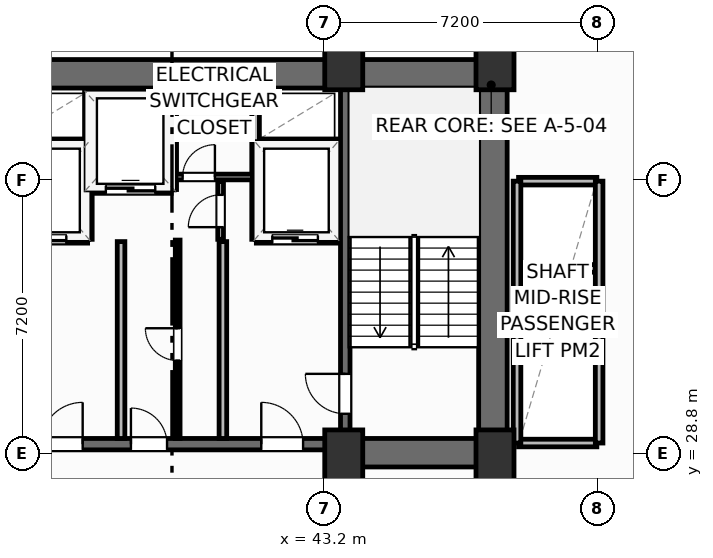
"""IFC4 building model, lengths in metres.
Left out: names, types, materials, properties, quantities, classifications, styles, units other than length and angle.
Written with IfcOpenShell. Run it as: python <this file> out.ifc"""

import sys

from ifc_helpers import new_model, si_unit, direction, frame, frame_2d, origin, origin_2d, place, context, subcontext, project, spatial, rectangle, extrude, element, fill, save


model = new_model("IFC4")
c1 = context("Model", 3, precision=1e-05, world=origin(), true_north=direction((0.0, 1.0)))
c2 = subcontext(c1, "Body", "Model", "MODEL_VIEW")
j1 = project(units=[si_unit("LENGTHUNIT", "METRE"), si_unit("PLANEANGLEUNIT", "RADIAN")], contexts=[c1])
p1 = place(None, origin())
s1 = spatial("IfcSite", under=j1, at=p1, CompositionType="ELEMENT")
p2 = place(p1, origin())
s2 = spatial("IfcBuilding", under=s1, at=p2, CompositionType="ELEMENT")
p3 = place(p2, frame((0.0, 0.0, 76.2)))
s3 = spatial("IfcBuildingStorey", under=s2, at=p3, CompositionType="ELEMENT", Elevation=76.2)
for number, where, z_axis, x_axis in (
    (1, (43.72, 28.75, 0.0), (0.0, 0.0, 1.0), (1.0, 0.0, 0.0)),
    (2, (47.7, 28.75, 0.0), (0.0, 0.0, 1.0), (1.0, 0.0, 0.0)),
    (3, (43.72, 39.05, 0.0), (0.0, 0.0, 1.0), (1.0, 0.0, 0.0)),
    (4, (47.7, 39.05, 0.0), (0.0, 0.0, 1.0), (1.0, 0.0, 0.0)),
):
    element("IfcColumn", number, at=place(p3, frame(where, z_axis=z_axis, x_axis=x_axis)), inside=s3, PredefinedType="COLUMN", context=c2, shape_type="SweptSolid", body=[
        extrude(rectangle(XDim=1.0, YDim=1.35, at=origin_2d()), origin(), (0.0, 0.0, 1.0), 3.7),
    ])
p4 = place(p3, frame((30.38, 38.795, 0.0), z_axis=(0.0, 0.0, 1.0), x_axis=(1.0, 0.0, 0.0)))
e5 = element("IfcWall", 5, at=p4, inside=s3, PredefinedType="SHEAR", context=c2, shape_type="SweptSolid", body=[
    extrude(rectangle(XDim=17.64, YDim=0.75, at=frame_2d((8.82, 0.0))), origin(), (0.0, 0.0, 1.0), 3.45),
])
p5 = place(p3, frame((47.645, 29.2, 0.0), z_axis=(0.0, 0.0, 1.0), x_axis=(0.0, 1.0, 0.0)))
e6 = element("IfcWall", 6, at=p5, inside=s3, PredefinedType="SHEAR", context=c2, shape_type="SweptSolid", body=[
    extrude(rectangle(XDim=9.22, YDim=0.75, at=frame_2d((4.61, 0.0))), origin(), (0.0, 0.0, 1.0), 3.45),
])
p6 = place(p3, frame((43.6, 28.825, 0.0), z_axis=(0.0, 0.0, 1.0), x_axis=(1.0, 0.0, 0.0)))
e7 = element("IfcWall", 7, at=p6, inside=s3, PredefinedType="SHEAR", context=c2, shape_type="SweptSolid", body=[
    extrude(rectangle(XDim=4.42, YDim=0.75, at=frame_2d((2.21, 0.0))), origin(), (0.0, 0.0, 1.0), 3.45),
])
p7 = place(p3, frame((34.8, 29.05, 0.0), z_axis=(0.0, 0.0, 1.0), x_axis=(1.0, 0.0, 0.0)))
e8 = element("IfcWall", 8, at=p7, inside=s3, PredefinedType="SHEAR", context=c2, shape_type="SweptSolid", body=[
    extrude(rectangle(XDim=8.8, YDim=0.3, at=frame_2d((4.4, 0.0))), origin(), (0.0, 0.0, 1.0), 3.45),
])
p8 = place(p7, frame((0.95, 0.0, 0.0)))
e9 = element("IfcOpeningElement", 9, at=p8, cuts=e8, PredefinedType="OPENING", context=c2, shape_type="SweptSolid", body=[
    extrude(rectangle(XDim=1.1, YDim=2.15, at=frame_2d((0.55, 1.075))), frame((0.0, 0.16, 0.0), z_axis=(0.0, -1.0, 0.0), x_axis=(1.0, 0.0, 0.0)), (0.0, 0.0, 1.0), 0.32),
])
p9 = place(p7, frame((6.75, 0.0, 0.0)))
e10 = element("IfcOpeningElement", 10, at=p9, cuts=e8, PredefinedType="OPENING", context=c2, shape_type="SweptSolid", body=[
    extrude(rectangle(XDim=1.1, YDim=2.15, at=frame_2d((0.55, 1.075))), frame((0.0, 0.16, 0.0), z_axis=(0.0, -1.0, 0.0), x_axis=(1.0, 0.0, 0.0)), (0.0, 0.0, 1.0), 0.32),
])
p10 = place(p7, frame((3.32, 0.0, 0.0)))
e11 = element("IfcOpeningElement", 11, at=p10, cuts=e8, PredefinedType="OPENING", context=c2, shape_type="SweptSolid", body=[
    extrude(rectangle(XDim=0.95, YDim=2.15, at=frame_2d((0.475, 1.075))), frame((0.0, 0.16, 0.0), z_axis=(0.0, -1.0, 0.0), x_axis=(1.0, 0.0, 0.0)), (0.0, 0.0, 1.0), 0.32),
])
p11 = place(p3, frame((43.76, 29.2, 0.0), z_axis=(0.0, 0.0, 1.0), x_axis=(0.0, 1.0, 0.0)))
e12 = element("IfcWall", 12, at=p11, inside=s3, PredefinedType="SHEAR", context=c2, shape_type="SweptSolid", body=[
    extrude(rectangle(XDim=9.22, YDim=0.25, at=frame_2d((4.61, 0.0))), origin(), (0.0, 0.0, 1.0), 3.45),
])
p12 = place(p11, frame((0.65, 0.0, 0.0)))
e13 = element("IfcOpeningElement", 13, at=p12, cuts=e12, PredefinedType="OPENING", context=c2, shape_type="SweptSolid", body=[
    extrude(rectangle(XDim=1.05, YDim=2.15, at=frame_2d((0.525, 1.075))), frame((0.0, 0.135, 0.0), z_axis=(0.0, -1.0, 0.0), x_axis=(1.0, 0.0, 0.0)), (0.0, 0.0, 1.0), 0.27),
])
for number, where, z_axis, x_axis in (
    (14, (37.86, 29.2, 0.0), (0.0, 0.0, 1.0), (0.0, 1.0, 0.0)),
    (15, (40.54, 29.2, 0.0), (0.0, 0.0, 1.0), (0.0, 1.0, 0.0)),
):
    element("IfcWall", number, at=place(p3, frame(where, z_axis=z_axis, x_axis=x_axis)), inside=s3, PredefinedType="PARTITIONING", context=c2, shape_type="SweptSolid", body=[
        extrude(rectangle(XDim=5.18, YDim=0.2, at=frame_2d((2.59, 0.0))), origin(), (0.0, 0.0, 1.0), 3.45),
    ])
p13 = place(p3, frame((34.8, 34.44, 0.0), z_axis=(0.0, 0.0, 1.0), x_axis=(1.0, 0.0, 0.0)))
e16 = element("IfcWall", 16, at=p13, inside=s3, PredefinedType="PARTITIONING", context=c2, shape_type="SweptSolid", body=[
    extrude(rectangle(XDim=2.18, YDim=0.2, at=frame_2d((1.09, 0.0))), origin(), (0.0, 0.0, 1.0), 3.45),
])
p14 = place(p13, frame((0.42, 0.0, 0.0)))
e17 = element("IfcOpeningElement", 17, at=p14, cuts=e16, PredefinedType="OPENING", context=c2, shape_type="SweptSolid", body=[
    extrude(rectangle(XDim=1.2, YDim=2.2, at=frame_2d((0.6, 1.1))), frame((0.0, 0.11, 0.0), z_axis=(0.0, -1.0, 0.0), x_axis=(1.0, 0.0, 0.0)), (0.0, 0.0, 1.0), 0.22),
])
p15 = place(p3, frame((34.8, 36.98, 0.0), z_axis=(0.0, 0.0, 1.0), x_axis=(1.0, 0.0, 0.0)))
e18 = element("IfcWall", 18, at=p15, inside=s3, PredefinedType="PARTITIONING", context=c2, shape_type="SweptSolid", body=[
    extrude(rectangle(XDim=2.18, YDim=0.2, at=frame_2d((1.09, 0.0))), origin(), (0.0, 0.0, 1.0), 3.45),
])
p16 = place(p3, frame((37.0, 34.44, 0.0), z_axis=(0.0, 0.0, 1.0), x_axis=(0.0, 1.0, 0.0)))
e19 = element("IfcWall", 19, at=p16, inside=s3, PredefinedType="PARTITIONING", context=c2, shape_type="SweptSolid", body=[
    extrude(rectangle(XDim=3.9, YDim=0.2, at=frame_2d((1.95, 0.0))), origin(), (0.0, 0.0, 1.0), 3.45),
])
p17 = place(p3, frame((41.42, 34.44, 0.0), z_axis=(0.0, 0.0, 1.0), x_axis=(1.0, 0.0, 0.0)))
e20 = element("IfcWall", 20, at=p17, inside=s3, PredefinedType="PARTITIONING", context=c2, shape_type="SweptSolid", body=[
    extrude(rectangle(XDim=2.18, YDim=0.2, at=frame_2d((1.09, 0.0))), origin(), (0.0, 0.0, 1.0), 3.45),
])
p18 = place(p17, frame((0.42, 0.0, 0.0)))
e21 = element("IfcOpeningElement", 21, at=p18, cuts=e20, PredefinedType="OPENING", context=c2, shape_type="SweptSolid", body=[
    extrude(rectangle(XDim=1.2, YDim=2.2, at=frame_2d((0.6, 1.1))), frame((0.0, 0.11, 0.0), z_axis=(0.0, -1.0, 0.0), x_axis=(1.0, 0.0, 0.0)), (0.0, 0.0, 1.0), 0.22),
])
p19 = place(p3, frame((41.42, 36.98, 0.0), z_axis=(0.0, 0.0, 1.0), x_axis=(1.0, 0.0, 0.0)))
e22 = element("IfcWall", 22, at=p19, inside=s3, PredefinedType="PARTITIONING", context=c2, shape_type="SweptSolid", body=[
    extrude(rectangle(XDim=2.18, YDim=0.2, at=frame_2d((1.09, 0.0))), origin(), (0.0, 0.0, 1.0), 3.45),
])
p20 = place(p3, frame((41.4, 34.44, 0.0), z_axis=(0.0, 0.0, 1.0), x_axis=(0.0, 1.0, 0.0)))
e23 = element("IfcWall", 23, at=p20, inside=s3, PredefinedType="PARTITIONING", context=c2, shape_type="SweptSolid", body=[
    extrude(rectangle(XDim=3.9, YDim=0.2, at=frame_2d((1.95, 0.0))), origin(), (0.0, 0.0, 1.0), 3.45),
])
p21 = place(p3, frame((37.06, 35.75, 0.0), z_axis=(0.0, 0.0, 1.0), x_axis=(1.0, 0.0, 0.0)))
e24 = element("IfcWall", 24, at=p21, inside=s3, PredefinedType="PARTITIONING", context=c2, shape_type="SweptSolid", body=[
    extrude(rectangle(XDim=2.12, YDim=0.2, at=frame_2d((1.06, 0.0))), origin(), (0.0, 0.0, 1.0), 3.45),
])
p22 = place(p21, frame((0.4, 0.0, 0.0)))
e25 = element("IfcOpeningElement", 25, at=p22, cuts=e24, PredefinedType="OPENING", context=c2, shape_type="SweptSolid", body=[
    extrude(rectangle(XDim=1.3, YDim=2.2, at=frame_2d((0.65, 1.1))), frame((0.0, 0.11, 0.0), z_axis=(0.0, -1.0, 0.0), x_axis=(1.0, 0.0, 0.0)), (0.0, 0.0, 1.0), 0.22),
])
p23 = place(p3, frame((39.22, 35.75, 0.0), z_axis=(0.0, 0.0, 1.0), x_axis=(0.0, 1.0, 0.0)))
e26 = element("IfcWall", 26, at=p23, inside=s3, PredefinedType="PARTITIONING", context=c2, shape_type="SweptSolid", body=[
    extrude(rectangle(XDim=2.59, YDim=0.2, at=frame_2d((1.295, 0.0))), origin(), (0.0, 0.0, 1.0), 3.45),
])
p24 = place(p3, frame((39.3, 36.08, 0.0), z_axis=(0.0, 0.0, 1.0), x_axis=(1.0, 0.0, 0.0)))
e27 = element("IfcWall", 27, at=p24, inside=s3, PredefinedType="PARTITIONING", context=c2, shape_type="SweptSolid", body=[
    extrude(rectangle(XDim=2.02, YDim=0.15, at=frame_2d((1.01, 0.0))), origin(), (0.0, 0.0, 1.0), 3.45),
])
p25 = place(p24, frame((0.18, 0.0, 0.0)))
e28 = element("IfcOpeningElement", 28, at=p25, cuts=e27, PredefinedType="OPENING", context=c2, shape_type="SweptSolid", body=[
    extrude(rectangle(XDim=0.85, YDim=2.05, at=frame_2d((0.425, 1.025))), frame((0.0, 0.085, 0.0), z_axis=(0.0, -1.0, 0.0), x_axis=(1.0, 0.0, 0.0)), (0.0, 0.0, 1.0), 0.17),
])
p26 = place(p3, frame((40.48, 34.44, 0.0), z_axis=(0.0, 0.0, 1.0), x_axis=(0.0, 1.0, 0.0)))
e29 = element("IfcWall", 29, at=p26, inside=s3, PredefinedType="PARTITIONING", context=c2, shape_type="SweptSolid", body=[
    extrude(rectangle(XDim=1.52, YDim=0.15, at=frame_2d((0.76, 0.0))), origin(), (0.0, 0.0, 1.0), 3.45),
])
p27 = place(p26, frame((0.32, 0.0, 0.0)))
e30 = element("IfcOpeningElement", 30, at=p27, cuts=e29, PredefinedType="OPENING", context=c2, shape_type="SweptSolid", body=[
    extrude(rectangle(XDim=0.85, YDim=2.05, at=frame_2d((0.425, 1.025))), frame((0.0, 0.085, 0.0), z_axis=(0.0, -1.0, 0.0), x_axis=(1.0, 0.0, 0.0)), (0.0, 0.0, 1.0), 0.17),
])
p28 = place(p3, frame((39.35, 29.2, 0.0), z_axis=(0.0, 0.0, 1.0), x_axis=(0.0, 1.0, 0.0)))
e31 = element("IfcWall", 31, at=p28, inside=s3, PredefinedType="PARTITIONING", context=c2, shape_type="SweptSolid", body=[
    extrude(rectangle(XDim=5.22, YDim=0.125, at=frame_2d((2.61, 0.0))), origin(), (0.0, 0.0, 1.0), 3.45),
])
p29 = place(p28, frame((2.05, 0.0, 0.0)))
e32 = element("IfcOpeningElement", 32, at=p29, cuts=e31, PredefinedType="OPENING", context=c2, shape_type="SweptSolid", body=[
    extrude(rectangle(XDim=0.85, YDim=2.05, at=frame_2d((0.425, 1.025))), frame((0.0, 0.073, 0.0), z_axis=(0.0, -1.0, 0.0), x_axis=(1.0, 0.0, 0.0)), (0.0, 0.0, 1.0), 0.145),
])
for number, where, z_axis, x_axis in (
    (33, (48.32, 31.375, 0.0), (0.0, 0.0, 1.0), (1.0, 0.0, 0.0)),
    (34, (48.32, 33.675, 0.0), (0.0, 0.0, 1.0), (1.0, 0.0, 0.0)),
):
    element("IfcWall", number, at=place(p3, frame(where, z_axis=z_axis, x_axis=x_axis)), inside=s3, PredefinedType="PARTITIONING", context=c2, shape_type="SweptSolid", body=[
        extrude(rectangle(XDim=2.06, YDim=0.2, at=frame_2d((1.03, 0.0))), origin(), (0.0, 0.0, 1.0), 3.45),
    ])
p30 = place(p3, frame((48.32, 29.08, 0.0), z_axis=(0.0, 0.0, 1.0), x_axis=(1.0, 0.0, 0.0)))
e35 = element("IfcWall", 35, at=p30, inside=s3, PredefinedType="PARTITIONING", context=c2, shape_type="SweptSolid", body=[
    extrude(rectangle(XDim=2.06, YDim=0.2, at=frame_2d((1.03, 0.0))), origin(), (0.0, 0.0, 1.0), 2.662),
])
p31 = place(p3, frame((48.32, 35.97, 0.0), z_axis=(0.0, 0.0, 1.0), x_axis=(1.0, 0.0, 0.0)))
e36 = element("IfcWall", 36, at=p31, inside=s3, PredefinedType="PARTITIONING", context=c2, shape_type="SweptSolid", body=[
    extrude(rectangle(XDim=2.06, YDim=0.2, at=frame_2d((1.03, 0.0))), origin(), (0.0, 0.0, 1.0), 3.45),
])
for number, where, z_axis, x_axis in (
    (37, (48.28, 29.08, 0.0), (0.0, 0.0, 1.0), (0.0, 1.0, 0.0)),
    (38, (50.44, 29.08, 0.0), (0.0, 0.0, 1.0), (0.0, 1.0, 0.0)),
):
    element("IfcWall", number, at=place(p3, frame(where, z_axis=z_axis, x_axis=x_axis)), inside=s3, PredefinedType="PARTITIONING", context=c2, shape_type="SweptSolid", body=[
        extrude(rectangle(XDim=6.89, YDim=0.2, at=frame_2d((3.445, 0.0))), origin(), (0.0, 0.0, 1.0), 3.45),
    ])
p32 = place(p12, origin())
e39 = element("IfcDoor", 39, at=p32, inside=s3, OperationType="SINGLE_SWING_RIGHT", PredefinedType="DOOR", context=c2, shape_type="SweptSolid", body=[
    extrude(rectangle(XDim=1.05, YDim=2.15, at=frame_2d((0.525, 1.075))), frame((0.0, 0.025, 0.0), z_axis=(0.0, -1.0, 0.0), x_axis=(1.0, 0.0, 0.0)), (0.0, 0.0, 1.0), 0.05),
])
fill(e13, e39)
p33 = place(p8, origin())
e40 = element("IfcDoor", 40, at=p33, inside=s3, OperationType="SINGLE_SWING_RIGHT", PredefinedType="DOOR", context=c2, shape_type="SweptSolid", body=[
    extrude(rectangle(XDim=1.1, YDim=2.15, at=frame_2d((0.55, 1.075))), frame((0.0, 0.025, 0.0), z_axis=(0.0, -1.0, 0.0), x_axis=(1.0, 0.0, 0.0)), (0.0, 0.0, 1.0), 0.05),
])
fill(e9, e40)
p34 = place(p9, origin())
e41 = element("IfcDoor", 41, at=p34, inside=s3, OperationType="SINGLE_SWING_LEFT", PredefinedType="DOOR", context=c2, shape_type="SweptSolid", body=[
    extrude(rectangle(XDim=1.1, YDim=2.15, at=frame_2d((0.55, 1.075))), frame((0.0, 0.025, 0.0), z_axis=(0.0, -1.0, 0.0), x_axis=(1.0, 0.0, 0.0)), (0.0, 0.0, 1.0), 0.05),
])
fill(e10, e41)
p35 = place(p14, origin())
e42 = element("IfcDoor", 42, at=p35, inside=s3, OperationType="SLIDING_TO_LEFT", PredefinedType="DOOR", context=c2, shape_type="SweptSolid", body=[
    extrude(rectangle(XDim=1.2, YDim=2.2, at=frame_2d((0.6, 1.1))), frame((0.0, 0.025, 0.0), z_axis=(0.0, -1.0, 0.0), x_axis=(1.0, 0.0, 0.0)), (0.0, 0.0, 1.0), 0.05),
])
fill(e17, e42)
p36 = place(p18, origin())
e43 = element("IfcDoor", 43, at=p36, inside=s3, OperationType="SLIDING_TO_LEFT", PredefinedType="DOOR", context=c2, shape_type="SweptSolid", body=[
    extrude(rectangle(XDim=1.2, YDim=2.2, at=frame_2d((0.6, 1.1))), frame((0.0, 0.025, 0.0), z_axis=(0.0, -1.0, 0.0), x_axis=(1.0, 0.0, 0.0)), (0.0, 0.0, 1.0), 0.05),
])
fill(e21, e43)
p37 = place(p22, origin())
e44 = element("IfcDoor", 44, at=p37, inside=s3, OperationType="SLIDING_TO_LEFT", PredefinedType="DOOR", context=c2, shape_type="SweptSolid", body=[
    extrude(rectangle(XDim=1.3, YDim=2.2, at=frame_2d((0.65, 1.1))), frame((0.0, 0.025, 0.0), z_axis=(0.0, -1.0, 0.0), x_axis=(1.0, 0.0, 0.0)), (0.0, 0.0, 1.0), 0.05),
])
fill(e25, e44)
p38 = place(p25, origin())
e45 = element("IfcDoor", 45, at=p38, inside=s3, OperationType="SINGLE_SWING_RIGHT", PredefinedType="DOOR", context=c2, shape_type="SweptSolid", body=[
    extrude(rectangle(XDim=0.85, YDim=2.05, at=frame_2d((0.425, 1.025))), frame((0.0, 0.025, 0.0), z_axis=(0.0, -1.0, 0.0), x_axis=(1.0, 0.0, 0.0)), (0.0, 0.0, 1.0), 0.05),
])
fill(e28, e45)
p39 = place(p27, origin())
e46 = element("IfcDoor", 46, at=p39, inside=s3, OperationType="SINGLE_SWING_LEFT", PredefinedType="DOOR", context=c2, shape_type="SweptSolid", body=[
    extrude(rectangle(XDim=0.85, YDim=2.05, at=frame_2d((0.425, 1.025))), frame((0.0, 0.025, 0.0), z_axis=(0.0, -1.0, 0.0), x_axis=(1.0, 0.0, 0.0)), (0.0, 0.0, 1.0), 0.05),
])
fill(e30, e46)
p40 = place(p29, origin())
e47 = element("IfcDoor", 47, at=p40, inside=s3, OperationType="SINGLE_SWING_RIGHT", PredefinedType="DOOR", context=c2, shape_type="SweptSolid", body=[
    extrude(rectangle(XDim=0.85, YDim=2.05, at=frame_2d((0.425, 1.025))), frame((0.0, 0.025, 0.0), z_axis=(0.0, -1.0, 0.0), x_axis=(1.0, 0.0, 0.0)), (0.0, 0.0, 1.0), 0.05),
])
fill(e32, e47)
p41 = place(p10, origin())
e48 = element("IfcDoor", 48, at=p41, inside=s3, OperationType="SINGLE_SWING_LEFT", PredefinedType="DOOR", context=c2, shape_type="SweptSolid", body=[
    extrude(rectangle(XDim=0.95, YDim=2.15, at=frame_2d((0.475, 1.075))), frame((0.0, 0.025, 0.0), z_axis=(0.0, -1.0, 0.0), x_axis=(1.0, 0.0, 0.0)), (0.0, 0.0, 1.0), 0.05),
])
fill(e11, e48)
save(model, sys.argv[1])
